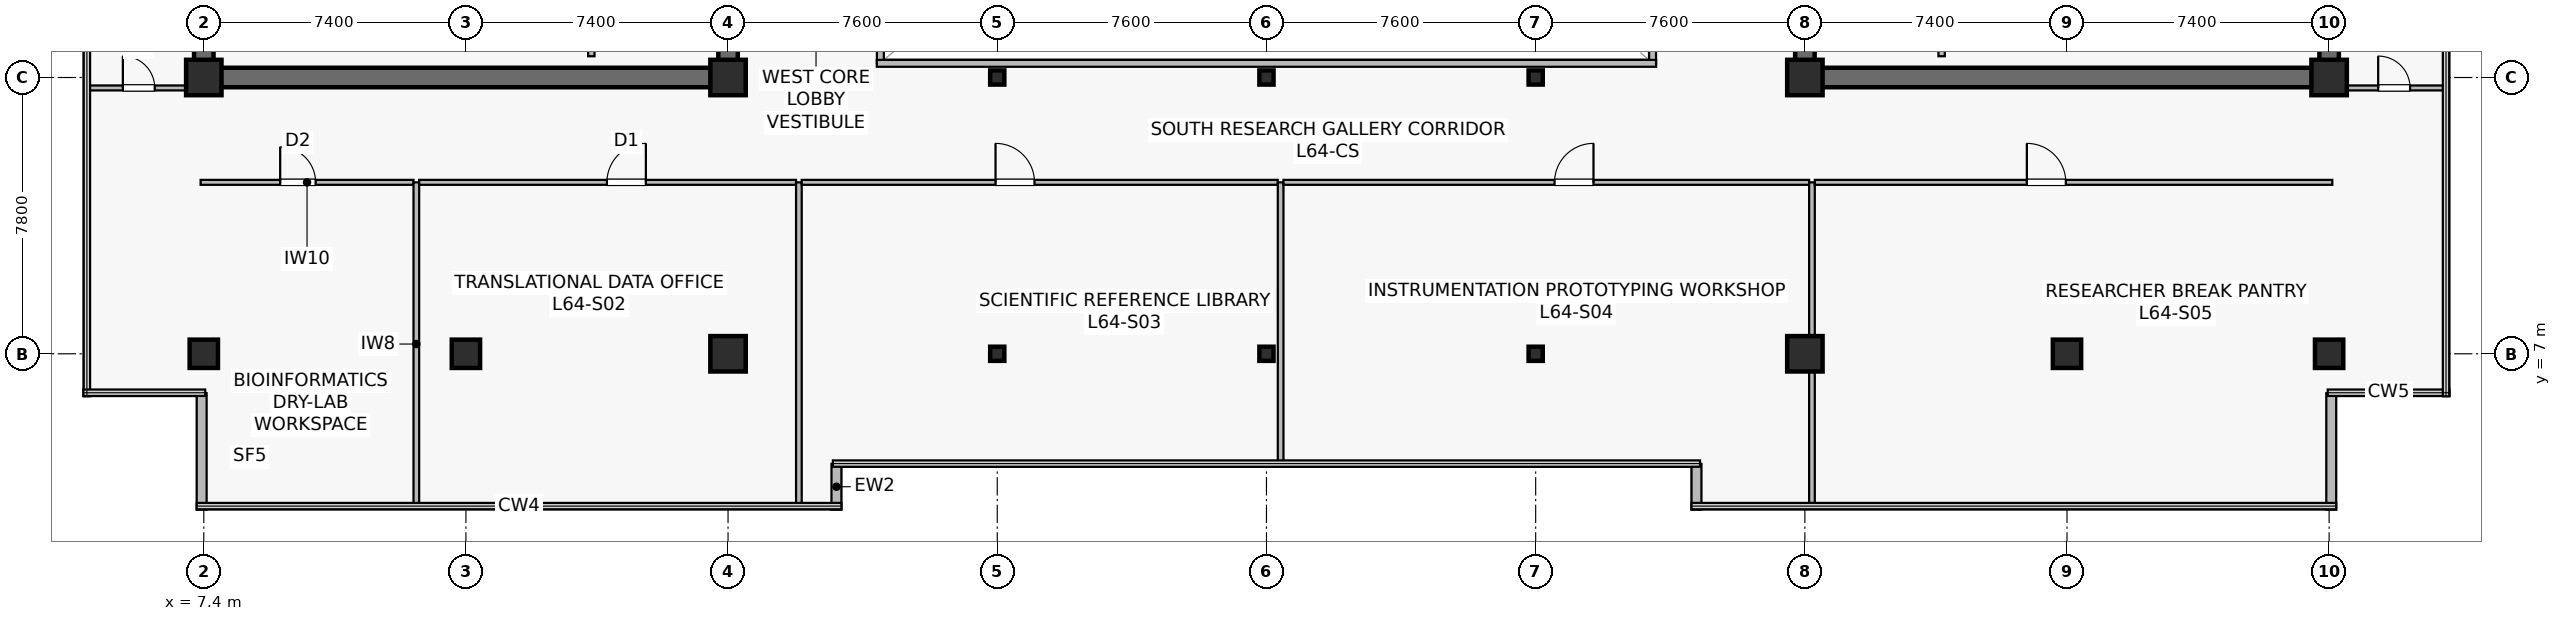
"""IFC4 building model, lengths in metres.
Left out: names, types, materials, properties, quantities, classifications, styles, units other than length and angle.
Written with IfcOpenShell. Run it as: python <this file> out.ifc"""

import sys

from ifc_helpers import new_model, si_unit, direction, frame, frame_2d, origin, origin_2d, place, context, subcontext, project, spatial, rectangle, hollow_rectangle, extrude, source, transform, mapped, element, fill, save


model = new_model("IFC4")
c1 = context("Model", 3, precision=1e-05, world=origin(), true_north=direction((0.0, 1.0)))
c2 = subcontext(c1, "Body", "Model", "MODEL_VIEW")
j1 = project(units=[si_unit("LENGTHUNIT", "METRE"), si_unit("PLANEANGLEUNIT", "RADIAN")], contexts=[c1])
p1 = place(None, origin())
s1 = spatial("IfcSite", under=j1, at=p1, CompositionType="ELEMENT")
p2 = place(p1, origin())
s2 = spatial("IfcBuilding", under=s1, at=p2, CompositionType="ELEMENT")
p3 = place(p2, frame((0.0, 0.0, 267.0)))
s3 = spatial("IfcBuildingStorey", under=s2, at=p3, CompositionType="ELEMENT", Elevation=267.0)
p4 = place(p3, frame((7.125, 14.8, 0.0), z_axis=(0.0, 0.0, 1.0), x_axis=(1.0, 0.0, 0.0)))
e1 = element("IfcWall", 1, at=p4, inside=s3, PredefinedType="SHEAR", context=c2, shape_type="SweptSolid", body=[
    extrude(rectangle(XDim=15.35, YDim=0.55, at=frame_2d((7.675, 0.0))), origin(), (0.0, 0.0, 1.0), 3.8),
])
p5 = place(p3, frame((7.4, 15.075, 0.0), z_axis=(0.0, 0.0, 1.0), x_axis=(0.0, 1.0, 0.0)))
e2 = element("IfcWall", 2, at=p5, inside=s3, PredefinedType="SHEAR", context=c2, shape_type="SweptSolid", body=[
    extrude(rectangle(XDim=18.45, YDim=0.55, at=frame_2d((9.225, 0.0))), origin(), (0.0, 0.0, 1.0), 3.8),
])
p6 = place(p3, frame((22.2, 15.075, 0.0), z_axis=(0.0, 0.0, 1.0), x_axis=(0.0, 1.0, 0.0)))
e3 = element("IfcWall", 3, at=p6, inside=s3, PredefinedType="SHEAR", context=c2, shape_type="SweptSolid", body=[
    extrude(rectangle(XDim=18.45, YDim=0.55, at=frame_2d((9.225, 0.0))), origin(), (0.0, 0.0, 1.0), 3.8),
])
p7 = place(p6, frame((3.475, 0.0, 0.0)))
e4 = element("IfcOpeningElement", 4, at=p7, cuts=e3, PredefinedType="OPENING", context=c2, shape_type="SweptSolid", body=[
    extrude(rectangle(XDim=1.42, YDim=2.2, at=frame_2d((0.71, 1.1))), frame((0.0, 0.285, 0.0), z_axis=(0.0, -1.0, 0.0), x_axis=(1.0, 0.0, 0.0)), (0.0, 0.0, 1.0), 0.57),
])
p8 = place(p3, frame((52.325, 14.8, 0.0), z_axis=(0.0, 0.0, 1.0), x_axis=(1.0, 0.0, 0.0)))
e5 = element("IfcWall", 5, at=p8, inside=s3, PredefinedType="SHEAR", context=c2, shape_type="SweptSolid", body=[
    extrude(rectangle(XDim=15.35, YDim=0.55, at=frame_2d((7.675, 0.0))), origin(), (0.0, 0.0, 1.0), 3.8),
])
p9 = place(p3, frame((52.6, 15.075, 0.0), z_axis=(0.0, 0.0, 1.0), x_axis=(0.0, 1.0, 0.0)))
e6 = element("IfcWall", 6, at=p9, inside=s3, PredefinedType="SHEAR", context=c2, shape_type="SweptSolid", body=[
    extrude(rectangle(XDim=18.45, YDim=0.55, at=frame_2d((9.225, 0.0))), origin(), (0.0, 0.0, 1.0), 3.8),
])
p10 = place(p9, frame((3.475, 0.0, 0.0)))
e7 = element("IfcOpeningElement", 7, at=p10, cuts=e6, PredefinedType="OPENING", context=c2, shape_type="SweptSolid", body=[
    extrude(rectangle(XDim=1.42, YDim=2.2, at=frame_2d((0.71, 1.1))), frame((0.0, 0.285, 0.0), z_axis=(0.0, -1.0, 0.0), x_axis=(1.0, 0.0, 0.0)), (0.0, 0.0, 1.0), 0.57),
])
p11 = place(p3, frame((67.4, 15.075, 0.0), z_axis=(0.0, 0.0, 1.0), x_axis=(0.0, 1.0, 0.0)))
e8 = element("IfcWall", 8, at=p11, inside=s3, PredefinedType="SHEAR", context=c2, shape_type="SweptSolid", body=[
    extrude(rectangle(XDim=18.45, YDim=0.55, at=frame_2d((9.225, 0.0))), origin(), (0.0, 0.0, 1.0), 3.8),
])
m1 = source(origin(), c2, "Body", "SweptSolid", [
    extrude(rectangle(XDim=0.8, YDim=0.8, at=origin_2d()), origin(), (0.0, 0.0, 1.0), 4.1),
])
p12 = place(p3, frame((14.8, 7.0, 0.0), z_axis=(0.0, 0.0, 1.0), x_axis=(1.0, 0.0, 0.0)))
e9 = element("IfcColumn", 9, at=p12, inside=s3, PredefinedType="COLUMN", context=c2, shape_type="MappedRepresentation", body=[
    mapped(m1, transform((0.0, 0.0, 0.0), scale=1.0)),
])
m2 = source(origin(), c2, "Body", "SweptSolid", [
    extrude(rectangle(XDim=1.0, YDim=1.0, at=origin_2d()), origin(), (0.0, 0.0, 1.0), 4.1),
])
for number, where, z_axis, x_axis in (
    (10, (22.2, 7.0, 0.0), (0.0, 0.0, 1.0), (1.0, 0.0, 0.0)),
    (11, (7.4, 14.8, 0.0), (0.0, 0.0, 1.0), (1.0, 0.0, 0.0)),
    (12, (22.2, 14.8, 0.0), (0.0, 0.0, 1.0), (1.0, 0.0, 0.0)),
    (13, (52.6, 7.0, 0.0), (0.0, 0.0, 1.0), (1.0, 0.0, 0.0)),
):
    element("IfcColumn", number, at=place(p3, frame(where, z_axis=z_axis, x_axis=x_axis)), inside=s3, PredefinedType="COLUMN", context=c2, shape_type="MappedRepresentation", body=[
        mapped(m2, transform((0.0, 0.0, 0.0), scale=1.0)),
    ])
p13 = place(p3, frame((60.0, 7.0, 0.0), z_axis=(0.0, 0.0, 1.0), x_axis=(1.0, 0.0, 0.0)))
e14 = element("IfcColumn", 14, at=p13, inside=s3, PredefinedType="COLUMN", context=c2, shape_type="MappedRepresentation", body=[
    mapped(m1, transform((0.0, 0.0, 0.0), scale=1.0)),
])
for number, where, z_axis, x_axis in (
    (15, (52.6, 14.8, 0.0), (0.0, 0.0, 1.0), (1.0, 0.0, 0.0)),
    (16, (67.4, 14.8, 0.0), (0.0, 0.0, 1.0), (1.0, 0.0, 0.0)),
):
    element("IfcColumn", number, at=place(p3, frame(where, z_axis=z_axis, x_axis=x_axis)), inside=s3, PredefinedType="COLUMN", context=c2, shape_type="MappedRepresentation", body=[
        mapped(m2, transform((0.0, 0.0, 0.0), scale=1.0)),
    ])
for number, where, z_axis, x_axis in (
    (17, (7.4, 7.0, 0.0), (0.0, 0.0, 1.0), (1.0, 0.0, 0.0)),
    (18, (67.4, 7.0, 0.0), (0.0, 0.0, 1.0), (1.0, 0.0, 0.0)),
):
    element("IfcColumn", number, at=place(p3, frame(where, z_axis=z_axis, x_axis=x_axis)), inside=s3, PredefinedType="COLUMN", context=c2, shape_type="MappedRepresentation", body=[
        mapped(m1, transform((0.0, 0.0, 0.0), scale=1.0)),
    ])
m3 = source(origin(), c2, "Body", "SweptSolid", [
    extrude(hollow_rectangle(XDim=0.4, YDim=0.4, WallThickness=0.019, at=origin_2d()), origin(), (0.0, 0.0, 1.0), 4.1),
])
for number, where, z_axis, x_axis in (
    (19, (29.8, 7.0, 0.0), (0.0, 0.0, 1.0), (1.0, 0.0, 0.0)),
    (20, (29.8, 14.8, 0.0), (0.0, 0.0, 1.0), (1.0, 0.0, 0.0)),
    (21, (37.4, 7.0, 0.0), (0.0, 0.0, 1.0), (1.0, 0.0, 0.0)),
    (22, (37.4, 14.8, 0.0), (0.0, 0.0, 1.0), (1.0, 0.0, 0.0)),
    (23, (45.0, 7.0, 0.0), (0.0, 0.0, 1.0), (1.0, 0.0, 0.0)),
    (24, (45.0, 14.8, 0.0), (0.0, 0.0, 1.0), (1.0, 0.0, 0.0)),
):
    element("IfcColumn", number, at=place(p3, frame(where, z_axis=z_axis, x_axis=x_axis)), inside=s3, PredefinedType="COLUMN", context=c2, shape_type="MappedRepresentation", body=[
        mapped(m3, transform((0.0, 0.0, 0.0), scale=1.0)),
    ])
for number, where, z_axis, x_axis in (
    (25, (25.26, 2.6, 0.0), (0.0, 0.0, 1.0), (0.0, 1.0, 0.0)),
    (26, (49.54, 3.893, 0.0), (0.0, 0.0, 1.0), (0.0, -1.0, 0.0)),
):
    element("IfcWall", number, at=place(p3, frame(where, z_axis=z_axis, x_axis=x_axis)), inside=s3, PredefinedType="STANDARD", context=c2, shape_type="SweptSolid", body=[
        extrude(rectangle(XDim=1.293, YDim=0.28, at=frame_2d((0.646, 0.0))), origin(), (0.0, 0.0, 1.0), 3.8),
    ])
for number, where, z_axis, x_axis in (
    (27, (67.46, 2.6, 0.0), (0.0, 0.0, 1.0), (0.0, 1.0, 0.0)),
    (28, (7.34, 5.888, 0.0), (0.0, 0.0, 1.0), (0.0, -1.0, 0.0)),
):
    element("IfcWall", number, at=place(p3, frame(where, z_axis=z_axis, x_axis=x_axis)), inside=s3, PredefinedType="STANDARD", context=c2, shape_type="SweptSolid", body=[
        extrude(rectangle(XDim=3.288, YDim=0.28, at=frame_2d((1.644, 0.0))), origin(), (0.0, 0.0, 1.0), 3.8),
    ])
for number, where, z_axis, x_axis in (
    (29, (18.34, 15.4, 0.0), (0.0, 0.0, 1.0), (0.0, 1.0, 0.0)),
    (30, (56.46, 15.4, 0.0), (0.0, 0.0, 1.0), (0.0, 1.0, 0.0)),
):
    element("IfcWall", number, at=place(p3, frame(where, z_axis=z_axis, x_axis=x_axis)), inside=s3, PredefinedType="SOLIDWALL", context=c2, shape_type="SweptSolid", body=[
        extrude(rectangle(XDim=2.4, YDim=0.18, at=frame_2d((1.2, 0.0))), origin(), (0.0, 0.0, 1.0), 3.8),
    ])
p14 = place(p3, frame((26.5, 15.2, 0.0), z_axis=(0.0, 0.0, 1.0), x_axis=(0.0, 1.0, 0.0)))
e31 = element("IfcWall", 31, at=p14, inside=s3, PredefinedType="SOLIDWALL", context=c2, shape_type="SweptSolid", body=[
    extrude(rectangle(XDim=18.2, YDim=0.195, at=frame_2d((9.1, 0.0))), origin(), (0.0, 0.0, 1.0), 3.8),
])
p15 = place(p14, frame((1.8, 0.0, 0.9)))
e32 = element("IfcOpeningElement", 32, at=p15, cuts=e31, PredefinedType="OPENING", context=c2, shape_type="SweptSolid", body=[
    extrude(rectangle(XDim=1.5, YDim=1.4, at=frame_2d((0.75, 0.7))), frame((0.0, 0.107, 0.0), z_axis=(0.0, -1.0, 0.0), x_axis=(1.0, 0.0, 0.0)), (0.0, 0.0, 1.0), 0.215),
])
p16 = place(p14, frame((13.2, 0.0, 0.9)))
e33 = element("IfcOpeningElement", 33, at=p16, cuts=e31, PredefinedType="OPENING", context=c2, shape_type="SweptSolid", body=[
    extrude(rectangle(XDim=1.5, YDim=1.4, at=frame_2d((0.75, 0.7))), frame((0.0, 0.107, 0.0), z_axis=(0.0, -1.0, 0.0), x_axis=(1.0, 0.0, 0.0)), (0.0, 0.0, 1.0), 0.215),
])
p17 = place(p3, frame((48.3, 15.2, 0.0), z_axis=(0.0, 0.0, 1.0), x_axis=(0.0, 1.0, 0.0)))
e34 = element("IfcWall", 34, at=p17, inside=s3, PredefinedType="SOLIDWALL", context=c2, shape_type="SweptSolid", body=[
    extrude(rectangle(XDim=18.2, YDim=0.195, at=frame_2d((9.1, 0.0))), origin(), (0.0, 0.0, 1.0), 3.8),
])
p18 = place(p17, frame((1.8, 0.0, 0.9)))
e35 = element("IfcOpeningElement", 35, at=p18, cuts=e34, PredefinedType="OPENING", context=c2, shape_type="SweptSolid", body=[
    extrude(rectangle(XDim=1.5, YDim=1.4, at=frame_2d((0.75, 0.7))), frame((0.0, 0.107, 0.0), z_axis=(0.0, -1.0, 0.0), x_axis=(1.0, 0.0, 0.0)), (0.0, 0.0, 1.0), 0.215),
])
p19 = place(p17, frame((13.2, 0.0, 0.9)))
e36 = element("IfcOpeningElement", 36, at=p19, cuts=e34, PredefinedType="OPENING", context=c2, shape_type="SweptSolid", body=[
    extrude(rectangle(XDim=1.5, YDim=1.4, at=frame_2d((0.75, 0.7))), frame((0.0, 0.107, 0.0), z_axis=(0.0, -1.0, 0.0), x_axis=(1.0, 0.0, 0.0)), (0.0, 0.0, 1.0), 0.215),
])
p20 = place(p3, frame((26.4, 15.2, 0.0), z_axis=(0.0, 0.0, 1.0), x_axis=(1.0, 0.0, 0.0)))
e37 = element("IfcWall", 37, at=p20, inside=s3, PredefinedType="SOLIDWALL", context=c2, shape_type="SweptSolid", body=[
    extrude(rectangle(XDim=22.0, YDim=0.195, at=frame_2d((11.0, 0.0))), origin(), (0.0, 0.0, 1.0), 3.8),
])
p21 = place(p3, frame((7.31, 11.84, 0.0), z_axis=(0.0, 0.0, 1.0), x_axis=(1.0, 0.0, 0.0)))
e38 = element("IfcWall", 38, at=p21, inside=s3, PredefinedType="PARTITIONING", context=c2, shape_type="SweptSolid", body=[
    extrude(rectangle(XDim=6.01, YDim=0.14, at=frame_2d((3.005, 0.0))), origin(), (0.0, 0.0, 1.0), 3.335),
])
p22 = place(p21, frame((2.246, 0.0, 0.0)))
e39 = element("IfcOpeningElement", 39, at=p22, cuts=e38, PredefinedType="OPENING", context=c2, shape_type="SweptSolid", body=[
    extrude(rectangle(XDim=1.0, YDim=2.15, at=frame_2d((0.5, 1.075))), frame((0.0, 0.08, 0.0), z_axis=(0.0, -1.0, 0.0), x_axis=(1.0, 0.0, 0.0)), (0.0, 0.0, 1.0), 0.16),
])
p23 = place(p3, frame((13.4, 2.71, 0.0), z_axis=(0.0, 0.0, 1.0), x_axis=(0.0, 1.0, 0.0)))
e40 = element("IfcWall", 40, at=p23, inside=s3, PredefinedType="PARTITIONING", context=c2, shape_type="SweptSolid", body=[
    extrude(rectangle(XDim=9.13, YDim=0.16, at=frame_2d((4.565, 0.0))), origin(), (0.0, 0.0, 1.0), 3.135),
])
p24 = place(p3, frame((13.48, 11.84, 0.0), z_axis=(0.0, 0.0, 1.0), x_axis=(1.0, 0.0, 0.0)))
e41 = element("IfcWall", 41, at=p24, inside=s3, PredefinedType="PARTITIONING", context=c2, shape_type="SweptSolid", body=[
    extrude(rectangle(XDim=10.64, YDim=0.14, at=frame_2d((5.32, 0.0))), origin(), (0.0, 0.0, 1.0), 3.197),
])
p25 = place(p24, frame((5.3, 0.0, 0.0)))
e42 = element("IfcOpeningElement", 42, at=p25, cuts=e41, PredefinedType="OPENING", context=c2, shape_type="SweptSolid", body=[
    extrude(rectangle(XDim=1.1, YDim=2.18, at=frame_2d((0.55, 1.09))), frame((0.0, 0.08, 0.0), z_axis=(0.0, -1.0, 0.0), x_axis=(1.0, 0.0, 0.0)), (0.0, 0.0, 1.0), 0.16),
])
p26 = place(p3, frame((24.2, 2.71, 0.0), z_axis=(0.0, 0.0, 1.0), x_axis=(0.0, 1.0, 0.0)))
e43 = element("IfcWall", 43, at=p26, inside=s3, PredefinedType="PARTITIONING", context=c2, shape_type="SweptSolid", body=[
    extrude(rectangle(XDim=9.13, YDim=0.16, at=frame_2d((4.565, 0.0))), origin(), (0.0, 0.0, 1.0), 3.135),
])
p27 = place(p3, frame((24.28, 11.84, 0.0), z_axis=(0.0, 0.0, 1.0), x_axis=(1.0, 0.0, 0.0)))
e44 = element("IfcWall", 44, at=p27, inside=s3, PredefinedType="PARTITIONING", context=c2, shape_type="SweptSolid", body=[
    extrude(rectangle(XDim=13.44, YDim=0.14, at=frame_2d((6.72, 0.0))), origin(), (0.0, 0.0, 1.0), 3.197),
])
p28 = place(p27, frame((5.472, 0.0, 0.0)))
e45 = element("IfcOpeningElement", 45, at=p28, cuts=e44, PredefinedType="OPENING", context=c2, shape_type="SweptSolid", body=[
    extrude(rectangle(XDim=1.1, YDim=2.18, at=frame_2d((0.55, 1.09))), frame((0.0, 0.08, 0.0), z_axis=(0.0, -1.0, 0.0), x_axis=(1.0, 0.0, 0.0)), (0.0, 0.0, 1.0), 0.16),
])
p29 = place(p3, frame((37.8, 3.91, 0.0), z_axis=(0.0, 0.0, 1.0), x_axis=(0.0, 1.0, 0.0)))
e46 = element("IfcWall", 46, at=p29, inside=s3, PredefinedType="PARTITIONING", context=c2, shape_type="SweptSolid", body=[
    extrude(rectangle(XDim=7.93, YDim=0.16, at=frame_2d((3.965, 0.0))), origin(), (0.0, 0.0, 1.0), 3.135),
])
p30 = place(p3, frame((37.88, 11.84, 0.0), z_axis=(0.0, 0.0, 1.0), x_axis=(1.0, 0.0, 0.0)))
e47 = element("IfcWall", 47, at=p30, inside=s3, PredefinedType="PARTITIONING", context=c2, shape_type="SweptSolid", body=[
    extrude(rectangle(XDim=14.84, YDim=0.14, at=frame_2d((7.42, 0.0))), origin(), (0.0, 0.0, 1.0), 3.197),
])
p31 = place(p30, frame((7.652, 0.0, 0.0)))
e48 = element("IfcOpeningElement", 48, at=p31, cuts=e47, PredefinedType="OPENING", context=c2, shape_type="SweptSolid", body=[
    extrude(rectangle(XDim=1.1, YDim=2.18, at=frame_2d((0.55, 1.09))), frame((0.0, 0.08, 0.0), z_axis=(0.0, -1.0, 0.0), x_axis=(1.0, 0.0, 0.0)), (0.0, 0.0, 1.0), 0.16),
])
p32 = place(p3, frame((52.8, 2.71, 0.0), z_axis=(0.0, 0.0, 1.0), x_axis=(0.0, 1.0, 0.0)))
e49 = element("IfcWall", 49, at=p32, inside=s3, PredefinedType="PARTITIONING", context=c2, shape_type="SweptSolid", body=[
    extrude(rectangle(XDim=9.13, YDim=0.16, at=frame_2d((4.565, 0.0))), origin(), (0.0, 0.0, 1.0), 3.135),
])
p33 = place(p3, frame((52.88, 11.84, 0.0), z_axis=(0.0, 0.0, 1.0), x_axis=(1.0, 0.0, 0.0)))
e50 = element("IfcWall", 50, at=p33, inside=s3, PredefinedType="PARTITIONING", context=c2, shape_type="SweptSolid", body=[
    extrude(rectangle(XDim=14.61, YDim=0.14, at=frame_2d((7.305, 0.0))), origin(), (0.0, 0.0, 1.0), 3.197),
])
p34 = place(p33, frame((5.986, 0.0, 0.0)))
e51 = element("IfcOpeningElement", 51, at=p34, cuts=e50, PredefinedType="OPENING", context=c2, shape_type="SweptSolid", body=[
    extrude(rectangle(XDim=1.1, YDim=2.18, at=frame_2d((0.55, 1.09))), frame((0.0, 0.08, 0.0), z_axis=(0.0, -1.0, 0.0), x_axis=(1.0, 0.0, 0.0)), (0.0, 0.0, 1.0), 0.16),
])
p35 = place(p3, frame((4.11, 14.505, 0.0), z_axis=(0.0, 0.0, 1.0), x_axis=(1.0, 0.0, 0.0)))
e52 = element("IfcWall", 52, at=p35, inside=s3, PredefinedType="PARTITIONING", context=c2, shape_type="SweptSolid", body=[
    extrude(rectangle(XDim=2.91, YDim=0.14, at=frame_2d((1.455, 0.0))), origin(), (0.0, 0.0, 1.0), 3.8),
])
p36 = place(p35, frame((1.005, 0.0, 0.0)))
e53 = element("IfcOpeningElement", 53, at=p36, cuts=e52, PredefinedType="OPENING", context=c2, shape_type="SweptSolid", body=[
    extrude(rectangle(XDim=0.9, YDim=2.1, at=frame_2d((0.45, 1.05))), frame((0.0, 0.08, 0.0), z_axis=(0.0, -1.0, 0.0), x_axis=(1.0, 0.0, 0.0)), (0.0, 0.0, 1.0), 0.16),
])
p37 = place(p3, frame((67.78, 14.505, 0.0), z_axis=(0.0, 0.0, 1.0), x_axis=(1.0, 0.0, 0.0)))
e54 = element("IfcWall", 54, at=p37, inside=s3, PredefinedType="PARTITIONING", context=c2, shape_type="SweptSolid", body=[
    extrude(rectangle(XDim=2.91, YDim=0.14, at=frame_2d((1.455, 0.0))), origin(), (0.0, 0.0, 1.0), 3.8),
])
p38 = place(p37, frame((1.005, 0.0, 0.0)))
e55 = element("IfcOpeningElement", 55, at=p38, cuts=e54, PredefinedType="OPENING", context=c2, shape_type="SweptSolid", body=[
    extrude(rectangle(XDim=0.9, YDim=2.1, at=frame_2d((0.45, 1.05))), frame((0.0, 0.08, 0.0), z_axis=(0.0, -1.0, 0.0), x_axis=(1.0, 0.0, 0.0)), (0.0, 0.0, 1.0), 0.16),
])
m4 = source(origin(), c2, "Body", "SweptSolid", [
    extrude(rectangle(XDim=1.0, YDim=2.15, at=frame_2d((0.5, 1.075))), frame((0.0, 0.025, 0.0), z_axis=(0.0, -1.0, 0.0), x_axis=(1.0, 0.0, 0.0)), (0.0, 0.0, 1.0), 0.05),
])
p39 = place(p22, origin())
e56 = element("IfcDoor", 56, at=p39, inside=s3, OperationType="SINGLE_SWING_LEFT", PredefinedType="DOOR", context=c2, shape_type="MappedRepresentation", body=[
    mapped(m4, transform((0.0, 0.0, 0.0), scale=1.0)),
])
fill(e39, e56)
m5 = source(origin(), c2, "Body", "SweptSolid", [
    extrude(rectangle(XDim=1.1, YDim=2.18, at=frame_2d((0.55, 1.09))), frame((0.0, 0.025, 0.0), z_axis=(0.0, -1.0, 0.0), x_axis=(1.0, 0.0, 0.0)), (0.0, 0.0, 1.0), 0.05),
])
p40 = place(p25, origin())
e57 = element("IfcDoor", 57, at=p40, inside=s3, OperationType="SINGLE_SWING_RIGHT", PredefinedType="DOOR", context=c2, shape_type="MappedRepresentation", body=[
    mapped(m5, transform((0.0, 0.0, 0.0), scale=1.0)),
])
fill(e42, e57)
p41 = place(p28, origin())
e58 = element("IfcDoor", 58, at=p41, inside=s3, OperationType="SINGLE_SWING_LEFT", PredefinedType="DOOR", context=c2, shape_type="MappedRepresentation", body=[
    mapped(m5, transform((0.0, 0.0, 0.0), scale=1.0)),
])
fill(e45, e58)
p42 = place(p31, origin())
e59 = element("IfcDoor", 59, at=p42, inside=s3, OperationType="SINGLE_SWING_RIGHT", PredefinedType="DOOR", context=c2, shape_type="MappedRepresentation", body=[
    mapped(m5, transform((0.0, 0.0, 0.0), scale=1.0)),
])
fill(e48, e59)
p43 = place(p34, origin())
e60 = element("IfcDoor", 60, at=p43, inside=s3, OperationType="SINGLE_SWING_LEFT", PredefinedType="DOOR", context=c2, shape_type="MappedRepresentation", body=[
    mapped(m5, transform((0.0, 0.0, 0.0), scale=1.0)),
])
fill(e51, e60)
m6 = source(origin(), c2, "Body", "SweptSolid", [
    extrude(rectangle(XDim=0.9, YDim=2.1, at=frame_2d((0.45, 1.05))), frame((0.0, 0.025, 0.0), z_axis=(0.0, -1.0, 0.0), x_axis=(1.0, 0.0, 0.0)), (0.0, 0.0, 1.0), 0.05),
])
p44 = place(p36, origin())
e61 = element("IfcDoor", 61, at=p44, inside=s3, OperationType="SINGLE_SWING_LEFT", PredefinedType="DOOR", context=c2, shape_type="MappedRepresentation", body=[
    mapped(m6, transform((0.0, 0.0, 0.0), scale=1.0)),
])
fill(e53, e61)
p45 = place(p38, origin())
e62 = element("IfcDoor", 62, at=p45, inside=s3, OperationType="SINGLE_SWING_LEFT", PredefinedType="DOOR", context=c2, shape_type="MappedRepresentation", body=[
    mapped(m6, transform((0.0, 0.0, 0.0), scale=1.0)),
])
fill(e55, e62)
save(model, sys.argv[1])
